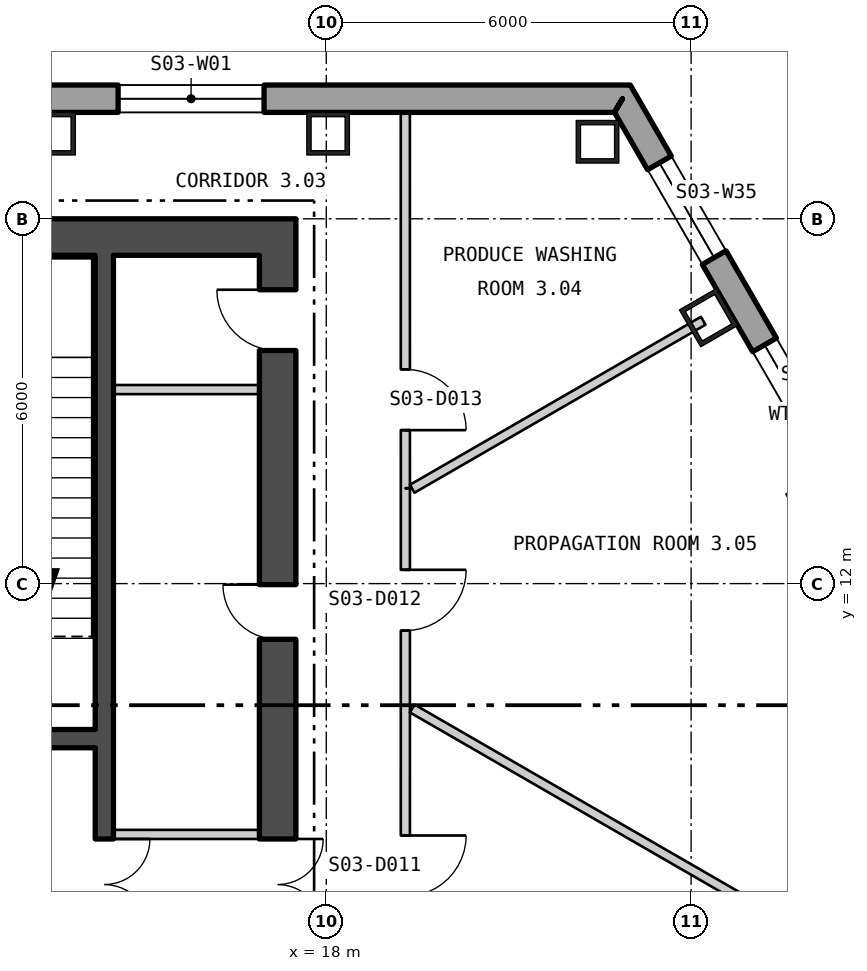
"""IFC4 building model, lengths in metres.
Left out: names, types, materials, properties, quantities, classifications, styles, units other than length and angle.
Written with IfcOpenShell. Run it as: python <this file> out.ifc"""

import sys

from ifc_helpers import new_model, si_unit, direction, frame, frame_2d, origin, origin_2d, place, context, subcontext, project, spatial, polyline, rectangle, hollow_rectangle, outline, extrude, element, fill, save


model = new_model("IFC4")
c1 = context("Model", 3, precision=1e-05, world=origin(), true_north=direction((0.0, 1.0)))
c2 = subcontext(c1, "Body", "Model", "MODEL_VIEW")
j1 = project(units=[si_unit("LENGTHUNIT", "METRE"), si_unit("PLANEANGLEUNIT", "RADIAN")], contexts=[c1])
p1 = place(None, origin())
s1 = spatial("IfcSite", under=j1, at=p1, CompositionType="ELEMENT")
p2 = place(p1, origin())
s2 = spatial("IfcBuilding", under=s1, at=p2, CompositionType="ELEMENT")
p3 = place(p2, frame((0.0, 0.0, 46.8)))
s3 = spatial("IfcBuildingStorey", under=s2, at=p3, CompositionType="ELEMENT", Elevation=46.8)
for number, where, z_axis, x_axis in (
    (1, (22.461, 19.267, 0.0), (0.0, 0.0, 1.0), (-1.0, 0.0, 0.0)),
    (2, (18.03, 19.4, 0.0), (0.0, 0.0, 1.0), (-1.0, 0.0, 0.0)),
    (3, (13.523, 19.4, 0.0), (0.0, 0.0, 1.0), (-1.0, 0.0, 0.0)),
    (4, (26.034, 13.346, 0.0), (0.0, 0.0, 1.0), (-0.5, 0.866, 0.0)),
    (5, (24.286, 16.373, 0.0), (0.0, 0.0, 1.0), (-0.5, 0.866, 0.0)),
):
    element("IfcColumn", number, at=place(p3, frame(where, z_axis=z_axis, x_axis=x_axis)), inside=s3, PredefinedType="COLUMN", context=c2, shape_type="SweptSolid", body=[
        extrude(hollow_rectangle(XDim=0.7, YDim=0.7, WallThickness=0.07, at=origin_2d()), origin(), (0.0, 0.0, 1.0), 4.5),
    ])
p4 = place(p3, frame((22.87, 19.975, -0.4), z_axis=(0.0, 0.0, 1.0), x_axis=(-1.0, 0.0, 0.0)))
e6 = element("IfcWall", 6, at=p4, inside=s3, PredefinedType="SOLIDWALL", context=c2, shape_type="SweptSolid", body=[
    extrude(outline(polyline([(-0.13, -0.225), (45.87, -0.225), (45.61, 0.225), (0.13, 0.225), (-0.13, -0.225)])), origin(), (0.0, 0.0, 1.0), 4.5),
])
p5 = place(p4, frame((5.893, 0.0, 1.3)))
e7 = element("IfcOpeningElement", 7, at=p5, cuts=e6, PredefinedType="OPENING", context=c2, shape_type="SweptSolid", body=[
    extrude(rectangle(XDim=2.4, YDim=2.6, at=frame_2d((1.2, 1.3))), frame((0.0, 0.235, 0.0), z_axis=(0.0, -1.0, 0.0), x_axis=(1.0, 0.0, 0.0)), (0.0, 0.0, 1.0), 0.47),
])
p6 = place(p4, frame((10.401, 0.0, 1.3)))
e8 = element("IfcOpeningElement", 8, at=p6, cuts=e6, PredefinedType="OPENING", context=c2, shape_type="SweptSolid", body=[
    extrude(rectangle(XDim=2.4, YDim=2.6, at=frame_2d((1.2, 1.3))), frame((0.0, 0.235, 0.0), z_axis=(0.0, -1.0, 0.0), x_axis=(1.0, 0.0, 0.0)), (0.0, 0.0, 1.0), 0.47),
])
p7 = place(p4, frame((14.909, 0.0, 1.3)))
e9 = element("IfcOpeningElement", 9, at=p7, cuts=e6, PredefinedType="OPENING", context=c2, shape_type="SweptSolid", body=[
    extrude(rectangle(XDim=2.4, YDim=2.6, at=frame_2d((1.2, 1.3))), frame((0.0, 0.235, 0.0), z_axis=(0.0, -1.0, 0.0), x_axis=(1.0, 0.0, 0.0)), (0.0, 0.0, 1.0), 0.47),
])
p8 = place(p4, frame((19.416, 0.0, 1.3)))
e10 = element("IfcOpeningElement", 10, at=p8, cuts=e6, PredefinedType="OPENING", context=c2, shape_type="SweptSolid", body=[
    extrude(rectangle(XDim=2.4, YDim=2.6, at=frame_2d((1.2, 1.3))), frame((0.0, 0.235, 0.0), z_axis=(0.0, -1.0, 0.0), x_axis=(1.0, 0.0, 0.0)), (0.0, 0.0, 1.0), 0.47),
])
p9 = place(p4, frame((23.924, 0.0, 1.3)))
e11 = element("IfcOpeningElement", 11, at=p9, cuts=e6, PredefinedType="OPENING", context=c2, shape_type="SweptSolid", body=[
    extrude(rectangle(XDim=2.4, YDim=2.6, at=frame_2d((1.2, 1.3))), frame((0.0, 0.235, 0.0), z_axis=(0.0, -1.0, 0.0), x_axis=(1.0, 0.0, 0.0)), (0.0, 0.0, 1.0), 0.47),
])
p10 = place(p4, frame((28.431, 0.0, 1.3)))
e12 = element("IfcOpeningElement", 12, at=p10, cuts=e6, PredefinedType="OPENING", context=c2, shape_type="SweptSolid", body=[
    extrude(rectangle(XDim=2.4, YDim=2.6, at=frame_2d((1.2, 1.3))), frame((0.0, 0.235, 0.0), z_axis=(0.0, -1.0, 0.0), x_axis=(1.0, 0.0, 0.0)), (0.0, 0.0, 1.0), 0.47),
])
p11 = place(p4, frame((32.939, 0.0, 1.3)))
e13 = element("IfcOpeningElement", 13, at=p11, cuts=e6, PredefinedType="OPENING", context=c2, shape_type="SweptSolid", body=[
    extrude(rectangle(XDim=2.4, YDim=2.6, at=frame_2d((1.2, 1.3))), frame((0.0, 0.235, 0.0), z_axis=(0.0, -1.0, 0.0), x_axis=(1.0, 0.0, 0.0)), (0.0, 0.0, 1.0), 0.47),
])
p12 = place(p4, frame((37.447, 0.0, 1.3)))
e14 = element("IfcOpeningElement", 14, at=p12, cuts=e6, PredefinedType="OPENING", context=c2, shape_type="SweptSolid", body=[
    extrude(rectangle(XDim=2.4, YDim=2.6, at=frame_2d((1.2, 1.3))), frame((0.0, 0.235, 0.0), z_axis=(0.0, -1.0, 0.0), x_axis=(1.0, 0.0, 0.0)), (0.0, 0.0, 1.0), 0.47),
])
p13 = place(p3, frame((5.575, -29.294, -0.18), z_axis=(0.0, 0.0, 1.0), x_axis=(0.499999764979, 0.866025539474, 0.0)))
e15 = element("IfcWall", 15, at=p13, inside=s3, PredefinedType="SOLIDWALL", context=c2, shape_type="SweptSolid", body=[
    extrude(outline(polyline([(-0.13, -0.225), (45.87, -0.225), (45.61, 0.225), (0.13, 0.225), (-0.13, -0.225)])), origin(), (0.0, 0.0, 1.0), 4.28),
])
p14 = place(p13, frame((1.424, 0.0, 1.08)))
e16 = element("IfcOpeningElement", 16, at=p14, cuts=e15, PredefinedType="OPENING", context=c2, shape_type="SweptSolid", body=[
    extrude(rectangle(XDim=2.4, YDim=2.6, at=frame_2d((1.2, 1.3))), frame((0.0, 0.235, 0.0), z_axis=(0.0, -1.0, 0.0), x_axis=(1.0, 0.0, 0.0)), (0.0, 0.0, 1.0), 0.47),
])
p15 = place(p13, frame((5.893, 0.0, 1.08)))
e17 = element("IfcOpeningElement", 17, at=p15, cuts=e15, PredefinedType="OPENING", context=c2, shape_type="SweptSolid", body=[
    extrude(rectangle(XDim=2.4, YDim=2.6, at=frame_2d((1.2, 1.3))), frame((0.0, 0.235, 0.0), z_axis=(0.0, -1.0, 0.0), x_axis=(1.0, 0.0, 0.0)), (0.0, 0.0, 1.0), 0.47),
])
p16 = place(p13, frame((10.401, 0.0, 1.08)))
e18 = element("IfcOpeningElement", 18, at=p16, cuts=e15, PredefinedType="OPENING", context=c2, shape_type="SweptSolid", body=[
    extrude(rectangle(XDim=2.4, YDim=2.6, at=frame_2d((1.2, 1.3))), frame((0.0, 0.235, 0.0), z_axis=(0.0, -1.0, 0.0), x_axis=(1.0, 0.0, 0.0)), (0.0, 0.0, 1.0), 0.47),
])
p17 = place(p13, frame((14.909, 0.0, 1.08)))
e19 = element("IfcOpeningElement", 19, at=p17, cuts=e15, PredefinedType="OPENING", context=c2, shape_type="SweptSolid", body=[
    extrude(rectangle(XDim=2.4, YDim=2.6, at=frame_2d((1.2, 1.3))), frame((0.0, 0.235, 0.0), z_axis=(0.0, -1.0, 0.0), x_axis=(1.0, 0.0, 0.0)), (0.0, 0.0, 1.0), 0.47),
])
p18 = place(p13, frame((19.416, 0.0, 1.08)))
e20 = element("IfcOpeningElement", 20, at=p18, cuts=e15, PredefinedType="OPENING", context=c2, shape_type="SweptSolid", body=[
    extrude(rectangle(XDim=2.4, YDim=2.6, at=frame_2d((1.2, 1.3))), frame((0.0, 0.235, 0.0), z_axis=(0.0, -1.0, 0.0), x_axis=(1.0, 0.0, 0.0)), (0.0, 0.0, 1.0), 0.47),
])
p19 = place(p13, frame((23.924, 0.0, 1.08)))
e21 = element("IfcOpeningElement", 21, at=p19, cuts=e15, PredefinedType="OPENING", context=c2, shape_type="SweptSolid", body=[
    extrude(rectangle(XDim=2.4, YDim=2.6, at=frame_2d((1.2, 1.3))), frame((0.0, 0.235, 0.0), z_axis=(0.0, -1.0, 0.0), x_axis=(1.0, 0.0, 0.0)), (0.0, 0.0, 1.0), 0.47),
])
p20 = place(p13, frame((37.447, 0.0, 1.08)))
e22 = element("IfcOpeningElement", 22, at=p20, cuts=e15, PredefinedType="OPENING", context=c2, shape_type="SweptSolid", body=[
    extrude(rectangle(XDim=2.4, YDim=2.6, at=frame_2d((1.2, 1.3))), frame((0.0, 0.235, 0.0), z_axis=(0.0, -1.0, 0.0), x_axis=(1.0, 0.0, 0.0)), (0.0, 0.0, 1.0), 0.47),
])
p21 = place(p13, frame((41.916, 0.0, 1.08)))
e23 = element("IfcOpeningElement", 23, at=p21, cuts=e15, PredefinedType="OPENING", context=c2, shape_type="SweptSolid", body=[
    extrude(rectangle(XDim=2.4, YDim=2.6, at=frame_2d((1.2, 1.3))), frame((0.0, 0.235, 0.0), z_axis=(0.0, -1.0, 0.0), x_axis=(1.0, 0.0, 0.0)), (0.0, 0.0, 1.0), 0.47),
])
p22 = place(p3, frame((28.445, 10.319, -0.4), z_axis=(0.0, 0.0, 1.0), x_axis=(-0.500002192499, 0.866024137941, 0.0)))
e24 = element("IfcWall", 24, at=p22, inside=s3, PredefinedType="SOLIDWALL", context=c2, shape_type="SweptSolid", body=[
    extrude(outline(polyline([(-0.13, -0.225), (11.28, -0.225), (11.02, 0.225), (0.13, 0.225), (-0.13, -0.225)])), origin(), (0.0, 0.0, 1.0), 4.5),
])
p23 = place(p22, frame((1.218, 0.0, 1.3)))
e25 = element("IfcOpeningElement", 25, at=p23, cuts=e24, PredefinedType="OPENING", context=c2, shape_type="SweptSolid", body=[
    extrude(rectangle(XDim=1.8, YDim=2.6, at=frame_2d((0.9, 1.3))), frame((0.0, 0.235, 0.0), z_axis=(0.0, -1.0, 0.0), x_axis=(1.0, 0.0, 0.0)), (0.0, 0.0, 1.0), 0.47),
])
p24 = place(p22, frame((4.675, 0.0, 1.3)))
e26 = element("IfcOpeningElement", 26, at=p24, cuts=e24, PredefinedType="OPENING", context=c2, shape_type="SweptSolid", body=[
    extrude(rectangle(XDim=1.8, YDim=2.6, at=frame_2d((0.9, 1.3))), frame((0.0, 0.235, 0.0), z_axis=(0.0, -1.0, 0.0), x_axis=(1.0, 0.0, 0.0)), (0.0, 0.0, 1.0), 0.47),
])
p25 = place(p22, frame((8.132, 0.0, 1.3)))
e27 = element("IfcOpeningElement", 27, at=p25, cuts=e24, PredefinedType="OPENING", context=c2, shape_type="SweptSolid", body=[
    extrude(rectangle(XDim=1.8, YDim=2.6, at=frame_2d((0.9, 1.3))), frame((0.0, 0.235, 0.0), z_axis=(0.0, -1.0, 0.0), x_axis=(1.0, 0.0, 0.0)), (0.0, 0.0, 1.0), 0.47),
])
p26 = place(p3, frame((-17.5, 17.7, 0.0), z_axis=(0.0, 0.0, 1.0), x_axis=(1.0, 0.0, 0.0)))
e28 = element("IfcWall", 28, at=p26, inside=s3, PredefinedType="SHEAR", context=c2, shape_type="SweptSolid", body=[
    extrude(rectangle(XDim=35.0, YDim=0.6, at=frame_2d((17.5, 0.0))), origin(), (0.0, 0.0, 1.0), 4.3),
])
p27 = place(p3, frame((17.2, 0.6, 0.0), z_axis=(0.0, 0.0, 1.0), x_axis=(0.0, 1.0, 0.0)))
e29 = element("IfcWall", 29, at=p27, inside=s3, PredefinedType="SHEAR", context=c2, shape_type="SweptSolid", body=[
    extrude(rectangle(XDim=16.8, YDim=0.6, at=frame_2d((8.4, 0.0))), origin(), (0.0, 0.0, 1.0), 4.3),
])
p28 = place(p27, frame((5.7, 0.0, 0.0)))
e30 = element("IfcOpeningElement", 30, at=p28, cuts=e29, PredefinedType="OPENING", context=c2, shape_type="SweptSolid", body=[
    extrude(rectangle(XDim=1.5, YDim=2.1, at=frame_2d((0.75, 1.05))), frame((0.0, 0.31, 0.0), z_axis=(0.0, -1.0, 0.0), x_axis=(1.0, 0.0, 0.0)), (0.0, 0.0, 1.0), 0.62),
])
p29 = place(p27, frame((1.488, 0.0, 0.0)))
e31 = element("IfcOpeningElement", 31, at=p29, cuts=e29, PredefinedType="OPENING", context=c2, shape_type="SweptSolid", body=[
    extrude(rectangle(XDim=0.9, YDim=2.1, at=frame_2d((0.45, 1.05))), frame((0.0, 0.31, 0.0), z_axis=(0.0, -1.0, 0.0), x_axis=(1.0, 0.0, 0.0)), (0.0, 0.0, 1.0), 0.62),
])
p30 = place(p27, frame((4.338, 0.0, 0.0)))
e32 = element("IfcOpeningElement", 32, at=p30, cuts=e29, PredefinedType="OPENING", context=c2, shape_type="SweptSolid", body=[
    extrude(rectangle(XDim=0.9, YDim=2.1, at=frame_2d((0.45, 1.05))), frame((0.0, 0.31, 0.0), z_axis=(0.0, -1.0, 0.0), x_axis=(1.0, 0.0, 0.0)), (0.0, 0.0, 1.0), 0.62),
])
p31 = place(p27, frame((10.483, 0.0, 0.0)))
e33 = element("IfcOpeningElement", 33, at=p31, cuts=e29, PredefinedType="OPENING", context=c2, shape_type="SweptSolid", body=[
    extrude(rectangle(XDim=0.9, YDim=2.1, at=frame_2d((0.45, 1.05))), frame((0.0, 0.31, 0.0), z_axis=(0.0, -1.0, 0.0), x_axis=(1.0, 0.0, 0.0)), (0.0, 0.0, 1.0), 0.62),
])
p32 = place(p27, frame((15.233, 0.0, 0.0)))
e34 = element("IfcOpeningElement", 34, at=p32, cuts=e29, PredefinedType="OPENING", context=c2, shape_type="SweptSolid", body=[
    extrude(rectangle(XDim=1.0, YDim=2.1, at=frame_2d((0.5, 1.05))), frame((0.0, 0.31, 0.0), z_axis=(0.0, -1.0, 0.0), x_axis=(1.0, 0.0, 0.0)), (0.0, 0.0, 1.0), 0.62),
])
p33 = place(p3, frame((14.35, 0.6, 0.0), z_axis=(0.0, 0.0, 1.0), x_axis=(0.0, 1.0, 0.0)))
e35 = element("IfcWall", 35, at=p33, inside=s3, PredefinedType="SHEAR", context=c2, shape_type="SweptSolid", body=[
    extrude(rectangle(XDim=16.8, YDim=0.3, at=frame_2d((8.4, 0.0))), origin(), (0.0, 0.0, 1.0), 4.3),
])
p34 = place(p33, frame((5.7, 0.0, 0.0)))
e36 = element("IfcOpeningElement", 36, at=p34, cuts=e35, PredefinedType="OPENING", context=c2, shape_type="SweptSolid", body=[
    extrude(rectangle(XDim=1.5, YDim=2.1, at=frame_2d((0.75, 1.05))), frame((0.0, 0.16, 0.0), z_axis=(0.0, -1.0, 0.0), x_axis=(1.0, 0.0, 0.0)), (0.0, 0.0, 1.0), 0.32),
])
p35 = place(p3, frame((11.0, 9.45, 0.0), z_axis=(0.0, 0.0, 1.0), x_axis=(1.0, 0.0, 0.0)))
e37 = element("IfcWall", 37, at=p35, inside=s3, PredefinedType="SHEAR", context=c2, shape_type="SweptSolid", body=[
    extrude(rectangle(XDim=3.2, YDim=0.3, at=frame_2d((1.6, 0.0))), origin(), (0.0, 0.0, 1.0), 4.3),
])
p36 = place(p35, frame((1.0, 0.0, 0.0)))
e38 = element("IfcOpeningElement", 38, at=p36, cuts=e37, PredefinedType="OPENING", context=c2, shape_type="SweptSolid", body=[
    extrude(rectangle(XDim=1.2, YDim=2.1, at=frame_2d((0.6, 1.05))), frame((0.0, 0.16, 0.0), z_axis=(0.0, -1.0, 0.0), x_axis=(1.0, 0.0, 0.0)), (0.0, 0.0, 1.0), 0.32),
])
for number, where, z_axis, x_axis in (
    (39, (14.5, 7.875, 0.0), (0.0, 0.0, 1.0), (1.0, 0.0, 0.0)),
    (40, (14.5, 15.191, 0.0), (0.0, 0.0, 1.0), (1.0, 0.0, 0.0)),
):
    element("IfcWall", number, at=place(p3, frame(where, z_axis=z_axis, x_axis=x_axis)), inside=s3, PredefinedType="PARTITIONING", context=c2, shape_type="SweptSolid", body=[
        extrude(rectangle(XDim=2.4, YDim=0.15, at=frame_2d((1.2, 0.0))), origin(), (0.0, 0.0, 1.0), 4.3),
    ])
p37 = place(p3, frame((19.3, -1.875, 0.0), z_axis=(0.0, 0.0, 1.0), x_axis=(6.4750065e-05, 0.999999997904, 0.0)))
e41 = element("IfcWall", 41, at=p37, inside=s3, PredefinedType="PARTITIONING", context=c2, shape_type="SweptSolid", body=[
    extrude(rectangle(XDim=15.444, YDim=0.15, at=frame_2d((7.722, 0.0))), origin(), (0.0, 0.0, 1.0), 4.3),
])
p38 = place(p37, frame((2.242, 0.0, 0.0)))
e42 = element("IfcOpeningElement", 42, at=p38, cuts=e41, PredefinedType="OPENING", context=c2, shape_type="SweptSolid", body=[
    extrude(rectangle(XDim=1.0, YDim=2.1, at=frame_2d((0.5, 1.05))), frame((0.0, 0.085, 0.0), z_axis=(0.0, -1.0, 0.0), x_axis=(1.0, 0.0, 0.0)), (0.0, 0.0, 1.0), 0.17),
])
p39 = place(p37, frame((4.664, 0.0, 0.0)))
e43 = element("IfcOpeningElement", 43, at=p39, cuts=e41, PredefinedType="OPENING", context=c2, shape_type="SweptSolid", body=[
    extrude(rectangle(XDim=1.0, YDim=2.1, at=frame_2d((0.5, 1.05))), frame((0.0, 0.085, 0.0), z_axis=(0.0, -1.0, 0.0), x_axis=(1.0, 0.0, 0.0)), (0.0, 0.0, 1.0), 0.17),
])
p40 = place(p37, frame((8.732, 0.0, 0.0)))
e44 = element("IfcOpeningElement", 44, at=p40, cuts=e41, PredefinedType="OPENING", context=c2, shape_type="SweptSolid", body=[
    extrude(rectangle(XDim=1.0, YDim=2.1, at=frame_2d((0.5, 1.05))), frame((0.0, 0.085, 0.0), z_axis=(0.0, -1.0, 0.0), x_axis=(1.0, 0.0, 0.0)), (0.0, 0.0, 1.0), 0.17),
])
p41 = place(p37, frame((13.102, 0.0, 0.0)))
e45 = element("IfcOpeningElement", 45, at=p41, cuts=e41, PredefinedType="OPENING", context=c2, shape_type="SweptSolid", body=[
    extrude(rectangle(XDim=1.0, YDim=2.1, at=frame_2d((0.5, 1.05))), frame((0.0, 0.085, 0.0), z_axis=(0.0, -1.0, 0.0), x_axis=(1.0, 0.0, 0.0)), (0.0, 0.0, 1.0), 0.17),
])
p42 = place(p3, frame((19.3, 19.749, 0.0), z_axis=(0.0, 0.0, 1.0), x_axis=(0.000161812296, -0.999999986908, 0.0)))
e46 = element("IfcWall", 46, at=p42, inside=s3, PredefinedType="PARTITIONING", context=c2, shape_type="SweptSolid", body=[
    extrude(rectangle(XDim=6.18, YDim=0.15, at=frame_2d((3.09, 0.0))), origin(), (0.0, 0.0, 1.0), 4.3),
])
p43 = place(p42, frame((4.225, 0.0, 0.0)))
e47 = element("IfcOpeningElement", 47, at=p43, cuts=e46, PredefinedType="OPENING", context=c2, shape_type="SweptSolid", body=[
    extrude(rectangle(XDim=1.0, YDim=2.1, at=frame_2d((0.5, 1.05))), frame((0.0, 0.085, 0.0), z_axis=(0.0, -1.0, 0.0), x_axis=(1.0, 0.0, 0.0)), (0.0, 0.0, 1.0), 0.17),
])
p44 = place(p3, frame((19.413, 9.946, 0.0), z_axis=(0.0, 0.0, 1.0), x_axis=(0.866042039906, -0.499971184285, 0.0)))
e48 = element("IfcWall", 48, at=p44, inside=s3, PredefinedType="PARTITIONING", context=c2, shape_type="SweptSolid", body=[
    extrude(rectangle(XDim=6.96, YDim=0.15, at=frame_2d((3.48, 0.0))), origin(), (0.0, 0.0, 1.0), 4.3),
])
p45 = place(p3, frame((19.413, 13.56, 0.0), z_axis=(0.0, 0.0, 1.0), x_axis=(0.866040948072, 0.499973075538, 0.0)))
e49 = element("IfcWall", 49, at=p45, inside=s3, PredefinedType="PARTITIONING", context=c2, shape_type="SweptSolid", body=[
    extrude(rectangle(XDim=5.526, YDim=0.15, at=frame_2d((2.763, 0.0))), origin(), (0.0, 0.0, 1.0), 4.3),
])
p46 = place(p5, origin())
e50 = element("IfcWindow", 50, at=p46, inside=s3, PartitioningType="SINGLE_PANEL", PredefinedType="WINDOW", context=c2, shape_type="SweptSolid", body=[
    extrude(rectangle(XDim=2.4, YDim=2.6, at=frame_2d((1.2, 1.3))), frame((0.0, 0.105, 0.0), z_axis=(0.0, -1.0, 0.0), x_axis=(1.0, 0.0, 0.0)), (0.0, 0.0, 1.0), 0.06),
])
fill(e7, e50)
p47 = place(p24, origin())
e51 = element("IfcWindow", 51, at=p47, inside=s3, PartitioningType="SINGLE_PANEL", PredefinedType="WINDOW", context=c2, shape_type="SweptSolid", body=[
    extrude(rectangle(XDim=1.8, YDim=2.6, at=frame_2d((0.9, 1.3))), frame((0.0, 0.105, 0.0), z_axis=(0.0, -1.0, 0.0), x_axis=(1.0, 0.0, 0.0)), (0.0, 0.0, 1.0), 0.06),
])
fill(e26, e51)
p48 = place(p25, origin())
e52 = element("IfcWindow", 52, at=p48, inside=s3, PartitioningType="SINGLE_PANEL", PredefinedType="WINDOW", context=c2, shape_type="SweptSolid", body=[
    extrude(rectangle(XDim=1.8, YDim=2.6, at=frame_2d((0.9, 1.3))), frame((0.0, 0.105, 0.0), z_axis=(0.0, -1.0, 0.0), x_axis=(1.0, 0.0, 0.0)), (0.0, 0.0, 1.0), 0.06),
])
fill(e27, e52)
p49 = place(p34, origin())
e53 = element("IfcDoor", 53, at=p49, inside=s3, OperationType="DOUBLE_DOOR_SINGLE_SWING", PredefinedType="DOOR", context=c2, shape_type="SweptSolid", body=[
    extrude(rectangle(XDim=1.5, YDim=2.1, at=frame_2d((0.75, 1.05))), frame((0.0, 0.025, 0.0), z_axis=(0.0, -1.0, 0.0), x_axis=(1.0, 0.0, 0.0)), (0.0, 0.0, 1.0), 0.05),
])
fill(e36, e53)
p50 = place(p28, origin())
e54 = element("IfcDoor", 54, at=p50, inside=s3, OperationType="DOUBLE_DOOR_SINGLE_SWING", PredefinedType="DOOR", context=c2, shape_type="SweptSolid", body=[
    extrude(rectangle(XDim=1.5, YDim=2.1, at=frame_2d((0.75, 1.05))), frame((0.0, 0.025, 0.0), z_axis=(0.0, -1.0, 0.0), x_axis=(1.0, 0.0, 0.0)), (0.0, 0.0, 1.0), 0.05),
])
fill(e30, e54)
p51 = place(p31, origin())
e55 = element("IfcDoor", 55, at=p51, inside=s3, OperationType="SINGLE_SWING_LEFT", PredefinedType="DOOR", context=c2, shape_type="SweptSolid", body=[
    extrude(rectangle(XDim=0.9, YDim=2.1, at=frame_2d((0.45, 1.05))), frame((0.0, 0.025, 0.0), z_axis=(0.0, -1.0, 0.0), x_axis=(1.0, 0.0, 0.0)), (0.0, 0.0, 1.0), 0.05),
])
fill(e33, e55)
p52 = place(p32, origin())
e56 = element("IfcDoor", 56, at=p52, inside=s3, OperationType="SINGLE_SWING_LEFT", PredefinedType="DOOR", context=c2, shape_type="SweptSolid", body=[
    extrude(rectangle(XDim=1.0, YDim=2.1, at=frame_2d((0.5, 1.05))), frame((0.0, 0.025, 0.0), z_axis=(0.0, -1.0, 0.0), x_axis=(1.0, 0.0, 0.0)), (0.0, 0.0, 1.0), 0.05),
])
fill(e34, e56)
p53 = place(p40, origin())
e57 = element("IfcDoor", 57, at=p53, inside=s3, OperationType="SINGLE_SWING_RIGHT", PredefinedType="DOOR", context=c2, shape_type="SweptSolid", body=[
    extrude(rectangle(XDim=1.0, YDim=2.1, at=frame_2d((0.5, 1.05))), frame((0.0, 0.025, 0.0), z_axis=(0.0, -1.0, 0.0), x_axis=(1.0, 0.0, 0.0)), (0.0, 0.0, 1.0), 0.05),
])
fill(e44, e57)
p54 = place(p41, origin())
e58 = element("IfcDoor", 58, at=p54, inside=s3, OperationType="SINGLE_SWING_RIGHT", PredefinedType="DOOR", context=c2, shape_type="SweptSolid", body=[
    extrude(rectangle(XDim=1.0, YDim=2.1, at=frame_2d((0.5, 1.05))), frame((0.0, 0.025, 0.0), z_axis=(0.0, -1.0, 0.0), x_axis=(1.0, 0.0, 0.0)), (0.0, 0.0, 1.0), 0.05),
])
fill(e45, e58)
p55 = place(p43, origin())
e59 = element("IfcDoor", 59, at=p55, inside=s3, OperationType="SINGLE_SWING_LEFT", PredefinedType="DOOR", context=c2, shape_type="SweptSolid", body=[
    extrude(rectangle(XDim=1.0, YDim=2.1, at=frame_2d((0.5, 1.05))), frame((0.0, 0.025, 0.0), z_axis=(0.0, -1.0, 0.0), x_axis=(1.0, 0.0, 0.0)), (0.0, 0.0, 1.0), 0.05),
])
fill(e47, e59)
save(model, sys.argv[1])
